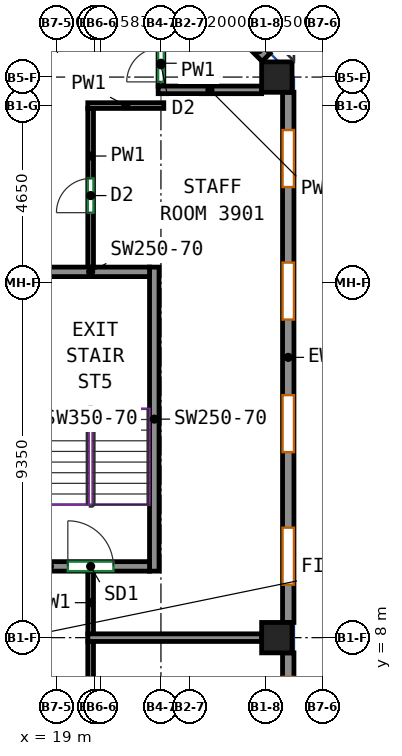
"""IFC4 building model, lengths in metres.
Left out: names, types, materials, properties, quantities, classifications, styles, units other than length and angle.
Written with IfcOpenShell. Run it as: python <this file> out.ifc"""

import sys

from ifc_helpers import new_model, si_unit, direction, frame, frame_2d, origin, origin_2d, place, context, subcontext, project, spatial, rectangle, extrude, source, transform, mapped, element, fill, save


model = new_model("IFC4")
c1 = context("Model", 3, precision=1e-05, world=origin(), true_north=direction((0.0, 1.0)))
c2 = subcontext(c1, "Body", "Model", "MODEL_VIEW")
j1 = project(units=[si_unit("LENGTHUNIT", "METRE"), si_unit("PLANEANGLEUNIT", "RADIAN")], contexts=[c1])
p1 = place(None, origin())
s1 = spatial("IfcSite", under=j1, at=p1, CompositionType="ELEMENT")
p2 = place(p1, origin())
s2 = spatial("IfcBuilding", under=s1, at=p2, CompositionType="ELEMENT")
p3 = place(p2, frame((0.0, 0.0, 168.5)))
s3 = spatial("IfcBuildingStorey", under=s2, at=p3, CompositionType="ELEMENT", Elevation=168.5)
m1 = source(origin(), c2, "Body", "SweptSolid", [
    extrude(rectangle(XDim=0.8, YDim=0.8, at=origin_2d()), origin(), (0.0, 0.0, 1.0), 3.12),
])
for number, where, z_axis, x_axis in (
    (1, (24.8, 8.0, 0.0), (0.0, 0.0, 1.0), (1.0, 0.0, 0.0)),
    (2, (24.8, 22.75, 0.0), (0.0, 0.0, 1.0), (1.0, 0.0, 0.0)),
):
    element("IfcColumn", number, at=place(p3, frame(where, z_axis=z_axis, x_axis=x_axis)), inside=s3, PredefinedType="COLUMN", context=c2, shape_type="MappedRepresentation", body=[
        mapped(m1, transform((0.0, 0.0, 0.0))),
    ])
m2 = source(origin(), c2, "Body", "SweptSolid", [
    extrude(rectangle(XDim=8.0, YDim=0.25, at=frame_2d((4.0, 0.0))), origin(), (0.0, 0.0, 1.0), 3.12),
])
p4 = place(p3, frame((21.575, 9.75, 0.0), z_axis=(0.0, 0.0, 1.0), x_axis=(0.0, 1.0, 0.0)))
e3 = element("IfcWall", 3, at=p4, inside=s3, PredefinedType="SHEAR", context=c2, shape_type="MappedRepresentation", body=[
    mapped(m2, transform((0.0, 0.0, 0.0))),
])
m3 = source(origin(), c2, "Body", "SweptSolid", [
    extrude(rectangle(XDim=3.1, YDim=0.25, at=frame_2d((1.55, 0.0))), origin(), (0.0, 0.0, 1.0), 3.12),
])
p5 = place(p3, frame((18.35, 9.875, 0.0), z_axis=(0.0, 0.0, 1.0), x_axis=(1.0, 0.0, 0.0)))
e4 = element("IfcWall", 4, at=p5, inside=s3, PredefinedType="SHEAR", context=c2, shape_type="MappedRepresentation", body=[
    mapped(m3, transform((0.0, 0.0, 0.0))),
])
p6 = place(p5, frame((0.95, 0.0, 0.0)))
e5 = element("IfcOpeningElement", 5, at=p6, cuts=e4, PredefinedType="OPENING", context=c2, shape_type="SweptSolid", body=[
    extrude(rectangle(XDim=1.2, YDim=2.1, at=frame_2d((0.6, 1.05))), frame((0.0, 0.135, 0.0), z_axis=(0.0, -1.0, 0.0), x_axis=(1.0, 0.0, 0.0)), (0.0, 0.0, 1.0), 0.27),
])
p7 = place(p3, frame((18.35, 17.625, 0.0), z_axis=(0.0, 0.0, 1.0), x_axis=(1.0, 0.0, 0.0)))
e6 = element("IfcWall", 6, at=p7, inside=s3, PredefinedType="SHEAR", context=c2, shape_type="MappedRepresentation", body=[
    mapped(m3, transform((0.0, 0.0, 0.0))),
])
m4 = source(origin(), c2, "Body", "SweptSolid", [
    extrude(rectangle(XDim=7.763, YDim=0.3, at=frame_2d((3.881, 0.0))), origin(), (0.0, 0.0, 1.0), 3.12),
])
p8 = place(p3, frame((25.1, -0.163, 0.0), z_axis=(0.0, 0.0, 1.0), x_axis=(0.0, 1.0, 0.0)))
e7 = element("IfcWall", 7, at=p8, inside=s3, PredefinedType="SOLIDWALL", context=c2, shape_type="MappedRepresentation", body=[
    mapped(m4, transform((0.0, 0.0, 0.0))),
])
p9 = place(p8, frame((1.75, 0.0, 0.85)))
e8 = element("IfcOpeningElement", 8, at=p9, cuts=e7, PredefinedType="OPENING", context=c2, shape_type="SweptSolid", body=[
    extrude(rectangle(XDim=1.5, YDim=1.95, at=frame_2d((0.75, 0.975))), frame((0.0, 0.16, 0.0), z_axis=(0.0, -1.0, 0.0), x_axis=(1.0, 0.0, 0.0)), (0.0, 0.0, 1.0), 0.32),
])
p10 = place(p8, frame((5.631, 0.0, 0.85)))
e9 = element("IfcOpeningElement", 9, at=p10, cuts=e7, PredefinedType="OPENING", context=c2, shape_type="SweptSolid", body=[
    extrude(rectangle(XDim=1.5, YDim=1.95, at=frame_2d((0.75, 0.975))), frame((0.0, 0.16, 0.0), z_axis=(0.0, -1.0, 0.0), x_axis=(1.0, 0.0, 0.0)), (0.0, 0.0, 1.0), 0.32),
])
m5 = source(origin(), c2, "Body", "SweptSolid", [
    extrude(rectangle(XDim=13.95, YDim=0.3, at=frame_2d((6.975, 0.0))), origin(), (0.0, 0.0, 1.0), 3.12),
])
p11 = place(p3, frame((25.1, 8.4, 0.0), z_axis=(0.0, 0.0, 1.0), x_axis=(0.0, 1.0, 0.0)))
e10 = element("IfcWall", 10, at=p11, inside=s3, PredefinedType="SOLIDWALL", context=c2, shape_type="MappedRepresentation", body=[
    mapped(m5, transform((0.0, 0.0, 0.0))),
])
p12 = place(p11, frame((0.994, 0.0, 0.85)))
e11 = element("IfcOpeningElement", 11, at=p12, cuts=e10, PredefinedType="OPENING", context=c2, shape_type="SweptSolid", body=[
    extrude(rectangle(XDim=1.5, YDim=1.95, at=frame_2d((0.75, 0.975))), frame((0.0, 0.16, 0.0), z_axis=(0.0, -1.0, 0.0), x_axis=(1.0, 0.0, 0.0)), (0.0, 0.0, 1.0), 0.32),
])
p13 = place(p11, frame((4.481, 0.0, 0.85)))
e12 = element("IfcOpeningElement", 12, at=p13, cuts=e10, PredefinedType="OPENING", context=c2, shape_type="SweptSolid", body=[
    extrude(rectangle(XDim=1.5, YDim=1.95, at=frame_2d((0.75, 0.975))), frame((0.0, 0.16, 0.0), z_axis=(0.0, -1.0, 0.0), x_axis=(1.0, 0.0, 0.0)), (0.0, 0.0, 1.0), 0.32),
])
p14 = place(p11, frame((7.969, 0.0, 0.85)))
e13 = element("IfcOpeningElement", 13, at=p14, cuts=e10, PredefinedType="OPENING", context=c2, shape_type="SweptSolid", body=[
    extrude(rectangle(XDim=1.5, YDim=1.95, at=frame_2d((0.75, 0.975))), frame((0.0, 0.16, 0.0), z_axis=(0.0, -1.0, 0.0), x_axis=(1.0, 0.0, 0.0)), (0.0, 0.0, 1.0), 0.32),
])
p15 = place(p11, frame((11.456, 0.0, 0.85)))
e14 = element("IfcOpeningElement", 14, at=p15, cuts=e10, PredefinedType="OPENING", context=c2, shape_type="SweptSolid", body=[
    extrude(rectangle(XDim=1.5, YDim=1.95, at=frame_2d((0.75, 0.975))), frame((0.0, 0.16, 0.0), z_axis=(0.0, -1.0, 0.0), x_axis=(1.0, 0.0, 0.0)), (0.0, 0.0, 1.0), 0.32),
])
m6 = source(origin(), c2, "Body", "SweptSolid", [
    extrude(rectangle(XDim=3.5, YDim=0.3, at=frame_2d((1.75, 0.0))), origin(), (0.0, 0.0, 1.0), 3.12),
])
p16 = place(p3, frame((24.519, 23.269, 0.0), z_axis=(0.0, 0.0, 1.0), x_axis=(-0.70707190453, 0.707141656123, 0.0)))
e15 = element("IfcWall", 15, at=p16, inside=s3, PredefinedType="SOLIDWALL", context=c2, shape_type="MappedRepresentation", body=[
    mapped(m6, transform((0.0, 0.0, 0.0))),
])
p17 = place(p16, frame((1.25, 0.0, 0.0)))
e16 = element("IfcOpeningElement", 16, at=p17, cuts=e15, PredefinedType="OPENING", context=c2, shape_type="SweptSolid", body=[
    extrude(rectangle(XDim=1.0, YDim=2.1, at=frame_2d((0.5, 1.05))), frame((0.0, 0.16, 0.0), z_axis=(0.0, -1.0, 0.0), x_axis=(1.0, 0.0, 0.0)), (0.0, 0.0, 1.0), 0.32),
])
p18 = place(p3, frame((19.9, 3.809, 0.0), z_axis=(0.0, 0.0, 1.0), x_axis=(0.0, 1.0, 0.0)))
e17 = element("IfcWall", 17, at=p18, inside=s3, PredefinedType="PARTITIONING", context=c2, shape_type="SweptSolid", body=[
    extrude(rectangle(XDim=4.101, YDim=0.15, at=frame_2d((2.05, 0.0))), origin(), (0.0, 0.0, 1.0), 3.12),
])
p19 = place(p18, frame((0.4, 0.0, 0.0)))
e18 = element("IfcOpeningElement", 18, at=p19, cuts=e17, PredefinedType="OPENING", context=c2, shape_type="SweptSolid", body=[
    extrude(rectangle(XDim=1.0, YDim=2.1, at=frame_2d((0.5, 1.05))), frame((0.0, 0.085, 0.0), z_axis=(0.0, -1.0, 0.0), x_axis=(1.0, 0.0, 0.0)), (0.0, 0.0, 1.0), 0.17),
])
p20 = place(p3, frame((19.825, 22.0, 0.0), z_axis=(0.0, 0.0, 1.0), x_axis=(1.0, 0.0, 0.0)))
e19 = element("IfcWall", 19, at=p20, inside=s3, PredefinedType="PARTITIONING", context=c2, shape_type="SweptSolid", body=[
    extrude(rectangle(XDim=2.0, YDim=0.15, at=frame_2d((1.0, 0.0))), origin(), (0.0, 0.0, 1.0), 3.12),
])
p21 = place(p3, frame((19.9, 17.75, 0.0), z_axis=(0.0, 0.0, 1.0), x_axis=(0.0, 1.0, 0.0)))
e20 = element("IfcWall", 20, at=p21, inside=s3, PredefinedType="PARTITIONING", context=c2, shape_type="SweptSolid", body=[
    extrude(rectangle(XDim=4.175, YDim=0.15, at=frame_2d((2.087, 0.0))), origin(), (0.0, 0.0, 1.0), 3.12),
])
p22 = place(p21, frame((1.432, 0.0, 0.0)))
e21 = element("IfcOpeningElement", 21, at=p22, cuts=e20, PredefinedType="OPENING", context=c2, shape_type="SweptSolid", body=[
    extrude(rectangle(XDim=0.9, YDim=2.1, at=frame_2d((0.45, 1.05))), frame((0.0, 0.085, 0.0), z_axis=(0.0, -1.0, 0.0), x_axis=(1.0, 0.0, 0.0)), (0.0, 0.0, 1.0), 0.17),
])
p23 = place(p3, frame((19.9, 8.09, 0.0), z_axis=(0.0, 0.0, 1.0), x_axis=(0.0, 1.0, 0.0)))
e22 = element("IfcWall", 22, at=p23, inside=s3, PredefinedType="PARTITIONING", context=c2, shape_type="SweptSolid", body=[
    extrude(rectangle(XDim=1.66, YDim=0.15, at=frame_2d((0.83, 0.0))), origin(), (0.0, 0.0, 1.0), 3.12),
])
p24 = place(p3, frame((21.75, 22.503, 0.0), z_axis=(0.0, 0.0, 1.0), x_axis=(0.0, 1.0, 0.0)))
e23 = element("IfcWall", 23, at=p24, inside=s3, PredefinedType="PARTITIONING", context=c2, shape_type="SweptSolid", body=[
    extrude(rectangle(XDim=1.222, YDim=0.15, at=frame_2d((0.611, 0.0))), origin(), (0.0, 0.0, 1.0), 3.12),
])
p25 = place(p24, frame((0.12, 0.0, 0.0)))
e24 = element("IfcOpeningElement", 24, at=p25, cuts=e23, PredefinedType="OPENING", context=c2, shape_type="SweptSolid", body=[
    extrude(rectangle(XDim=0.9, YDim=2.1, at=frame_2d((0.45, 1.05))), frame((0.0, 0.085, 0.0), z_axis=(0.0, -1.0, 0.0), x_axis=(1.0, 0.0, 0.0)), (0.0, 0.0, 1.0), 0.17),
])
p26 = place(p3, frame((19.827, 8.0, 0.0), z_axis=(0.0, 0.0, 1.0), x_axis=(1.0, 0.0, 0.0)))
e25 = element("IfcWall", 25, at=p26, inside=s3, PredefinedType="PARTITIONING", context=c2, shape_type="SweptSolid", body=[
    extrude(rectangle(XDim=4.573, YDim=0.2, at=frame_2d((2.287, 0.0))), origin(), (0.0, 0.0, 1.0), 3.12),
])
p27 = place(p3, frame((24.4, 22.413, 0.0), z_axis=(0.0, 0.0, 1.0), x_axis=(-1.0, 0.0, 0.0)))
e26 = element("IfcWall", 26, at=p27, inside=s3, PredefinedType="PARTITIONING", context=c2, shape_type="SweptSolid", body=[
    extrude(rectangle(XDim=2.723, YDim=0.2, at=frame_2d((1.361, 0.0))), origin(), (0.0, 0.0, 1.0), 2.52),
])
p28 = place(p12, origin())
e27 = element("IfcWindow", 27, at=p28, inside=s3, PartitioningType="SINGLE_PANEL", PredefinedType="WINDOW", context=c2, shape_type="SweptSolid", body=[
    extrude(rectangle(XDim=1.5, YDim=1.95, at=frame_2d((0.75, 0.975))), frame((0.0, 0.03, 0.0), z_axis=(0.0, -1.0, 0.0), x_axis=(1.0, 0.0, 0.0)), (0.0, 0.0, 1.0), 0.06),
])
fill(e11, e27)
p29 = place(p13, origin())
e28 = element("IfcWindow", 28, at=p29, inside=s3, PartitioningType="SINGLE_PANEL", PredefinedType="WINDOW", context=c2, shape_type="SweptSolid", body=[
    extrude(rectangle(XDim=1.5, YDim=1.95, at=frame_2d((0.75, 0.975))), frame((0.0, 0.03, 0.0), z_axis=(0.0, -1.0, 0.0), x_axis=(1.0, 0.0, 0.0)), (0.0, 0.0, 1.0), 0.06),
])
fill(e12, e28)
p30 = place(p14, origin())
e29 = element("IfcWindow", 29, at=p30, inside=s3, PartitioningType="SINGLE_PANEL", PredefinedType="WINDOW", context=c2, shape_type="SweptSolid", body=[
    extrude(rectangle(XDim=1.5, YDim=1.95, at=frame_2d((0.75, 0.975))), frame((0.0, 0.03, 0.0), z_axis=(0.0, -1.0, 0.0), x_axis=(1.0, 0.0, 0.0)), (0.0, 0.0, 1.0), 0.06),
])
fill(e13, e29)
p31 = place(p15, origin())
e30 = element("IfcWindow", 30, at=p31, inside=s3, PartitioningType="SINGLE_PANEL", PredefinedType="WINDOW", context=c2, shape_type="SweptSolid", body=[
    extrude(rectangle(XDim=1.5, YDim=1.95, at=frame_2d((0.75, 0.975))), frame((0.0, 0.03, 0.0), z_axis=(0.0, -1.0, 0.0), x_axis=(1.0, 0.0, 0.0)), (0.0, 0.0, 1.0), 0.06),
])
fill(e14, e30)
p32 = place(p6, origin())
e31 = element("IfcDoor", 31, at=p32, inside=s3, OperationType="DOUBLE_DOOR_SINGLE_SWING", PredefinedType="DOOR", context=c2, shape_type="SweptSolid", body=[
    extrude(rectangle(XDim=1.2, YDim=2.1, at=frame_2d((0.6, 1.05))), frame((0.0, 0.025, 0.0), z_axis=(0.0, -1.0, 0.0), x_axis=(1.0, 0.0, 0.0)), (0.0, 0.0, 1.0), 0.05),
])
fill(e5, e31)
p33 = place(p22, origin())
e32 = element("IfcDoor", 32, at=p33, inside=s3, OperationType="SINGLE_SWING_LEFT", PredefinedType="DOOR", context=c2, shape_type="SweptSolid", body=[
    extrude(rectangle(XDim=0.9, YDim=2.1, at=frame_2d((0.45, 1.05))), frame((0.0, 0.025, 0.0), z_axis=(0.0, -1.0, 0.0), x_axis=(1.0, 0.0, 0.0)), (0.0, 0.0, 1.0), 0.05),
])
fill(e21, e32)
p34 = place(p25, origin())
e33 = element("IfcDoor", 33, at=p34, inside=s3, OperationType="SINGLE_SWING_LEFT", PredefinedType="DOOR", context=c2, shape_type="SweptSolid", body=[
    extrude(rectangle(XDim=0.9, YDim=2.1, at=frame_2d((0.45, 1.05))), frame((0.0, 0.025, 0.0), z_axis=(0.0, -1.0, 0.0), x_axis=(1.0, 0.0, 0.0)), (0.0, 0.0, 1.0), 0.05),
])
fill(e24, e33)
save(model, sys.argv[1])
